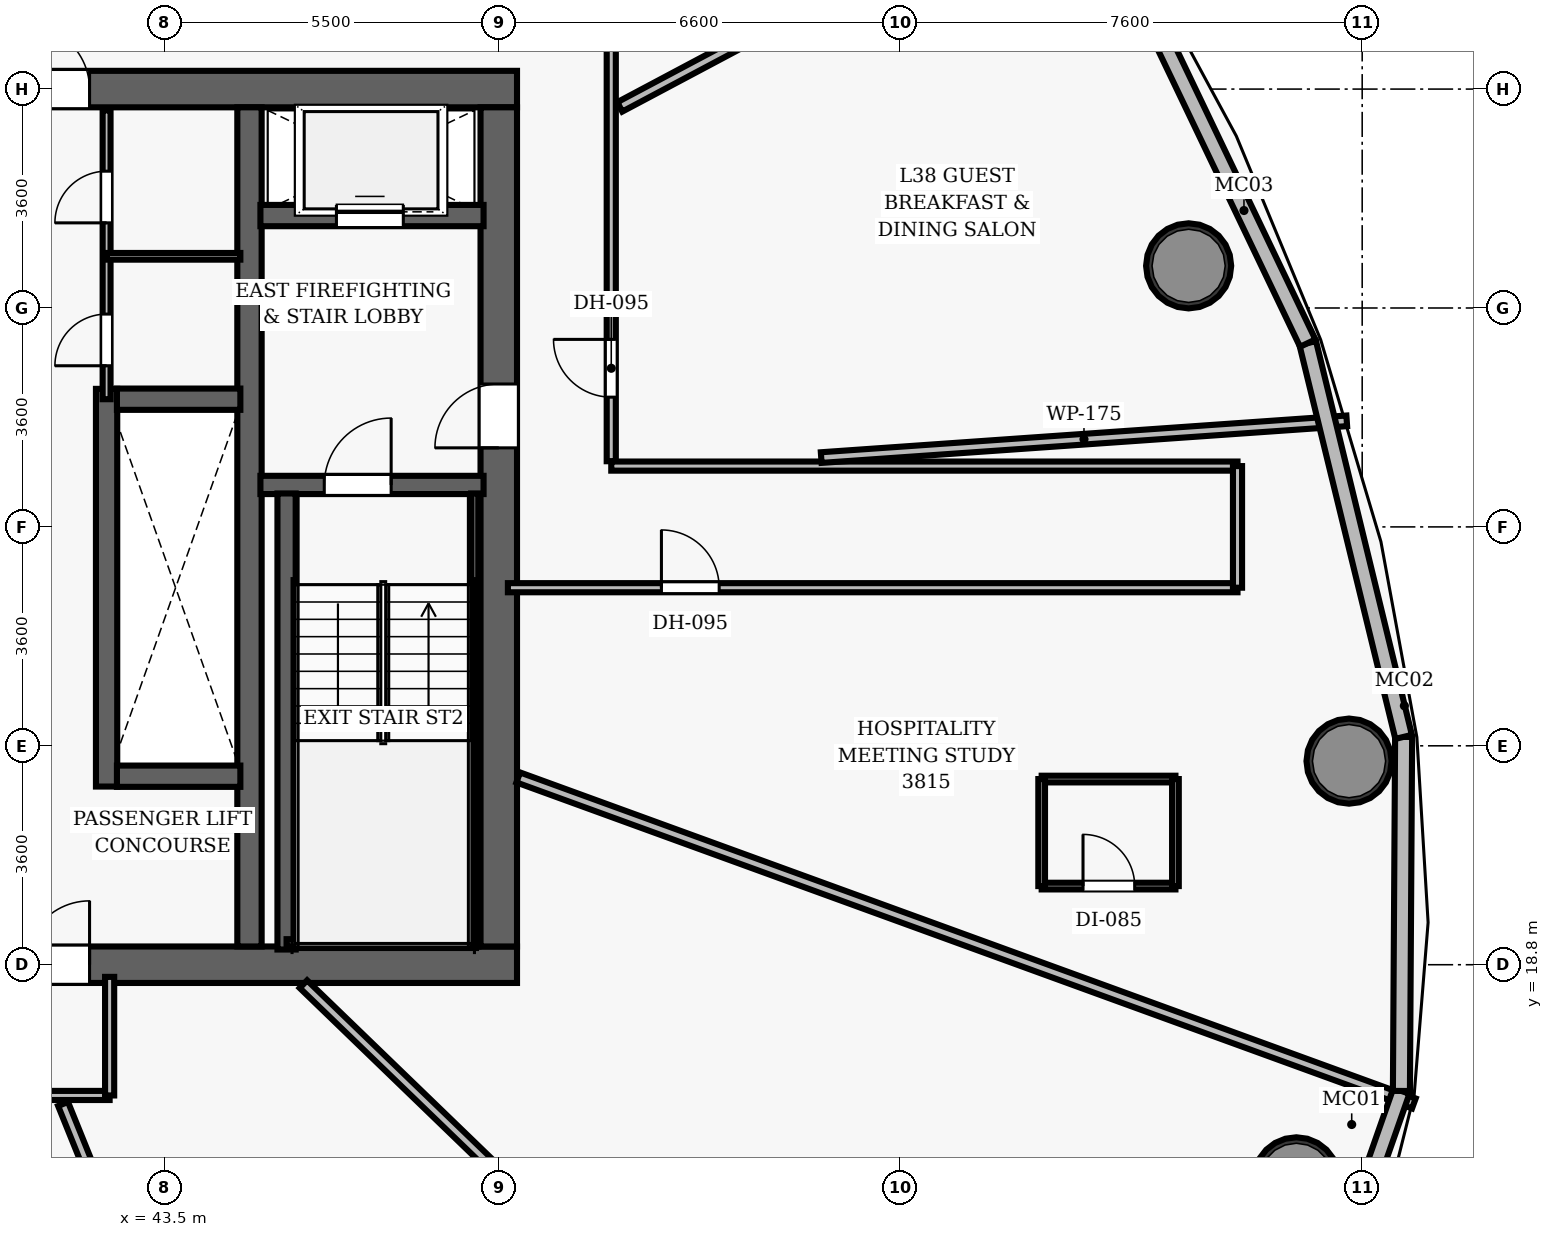
"""IFC4 building model, lengths in metres.
Left out: names, types, materials, properties, quantities, classifications, styles, units other than length and angle.
Written with IfcOpenShell. Run it as: python <this file> out.ifc"""

import sys

from ifc_helpers import new_model, si_unit, direction, frame, frame_2d, origin, origin_2d, place, context, subcontext, project, spatial, rectangle, hollow_circle, extrude, element, fill, save


model = new_model("IFC4")
c1 = context("Model", 3, precision=1e-05, world=origin(), true_north=direction((0.0, 1.0)))
c2 = subcontext(c1, "Body", "Model", "MODEL_VIEW")
j1 = project(units=[si_unit("LENGTHUNIT", "METRE"), si_unit("PLANEANGLEUNIT", "RADIAN")], contexts=[c1])
p1 = place(None, origin())
s1 = spatial("IfcSite", under=j1, at=p1, CompositionType="ELEMENT")
p2 = place(p1, origin())
s2 = spatial("IfcBuilding", under=s1, at=p2, CompositionType="ELEMENT")
p3 = place(p2, frame((0.0, 0.0, 151.8)))
s3 = spatial("IfcBuildingStorey", under=s2, at=p3, CompositionType="ELEMENT", Elevation=151.8)
p4 = place(p3, frame((26.7, 18.8, 0.0), z_axis=(0.0, 0.0, 1.0), x_axis=(1.0, 0.0, 0.0)))
e1 = element("IfcWall", 1, at=p4, inside=s3, PredefinedType="SHEAR", context=c2, shape_type="SweptSolid", body=[
    extrude(rectangle(XDim=22.6, YDim=0.6, at=frame_2d((11.3, 0.0))), origin(), (0.0, 0.0, 1.0), 3.5),
])
p5 = place(p4, frame((14.52, 0.0, 0.0)))
e2 = element("IfcOpeningElement", 2, at=p5, cuts=e1, PredefinedType="OPENING", context=c2, shape_type="SweptSolid", body=[
    extrude(rectangle(XDim=1.05, YDim=2.15, at=frame_2d((0.525, 1.075))), frame((0.0, 0.31, 0.0), z_axis=(0.0, -1.0, 0.0), x_axis=(1.0, 0.0, 0.0)), (0.0, 0.0, 1.0), 0.62),
])
p6 = place(p3, frame((26.7, 33.2, 0.0), z_axis=(0.0, 0.0, 1.0), x_axis=(1.0, 0.0, 0.0)))
e3 = element("IfcWall", 3, at=p6, inside=s3, PredefinedType="SHEAR", context=c2, shape_type="SweptSolid", body=[
    extrude(rectangle(XDim=22.6, YDim=0.6, at=frame_2d((11.3, 0.0))), origin(), (0.0, 0.0, 1.0), 3.5),
])
p7 = place(p6, frame((4.62, 0.0, 0.0)))
e4 = element("IfcOpeningElement", 4, at=p7, cuts=e3, PredefinedType="OPENING", context=c2, shape_type="SweptSolid", body=[
    extrude(rectangle(XDim=1.05, YDim=2.15, at=frame_2d((0.525, 1.075))), frame((0.0, 0.31, 0.0), z_axis=(0.0, -1.0, 0.0), x_axis=(1.0, 0.0, 0.0)), (0.0, 0.0, 1.0), 0.62),
])
p8 = place(p6, frame((14.52, 0.0, 0.0)))
e5 = element("IfcOpeningElement", 5, at=p8, cuts=e3, PredefinedType="OPENING", context=c2, shape_type="SweptSolid", body=[
    extrude(rectangle(XDim=1.05, YDim=2.15, at=frame_2d((0.525, 1.075))), frame((0.0, 0.31, 0.0), z_axis=(0.0, -1.0, 0.0), x_axis=(1.0, 0.0, 0.0)), (0.0, 0.0, 1.0), 0.62),
])
p9 = place(p3, frame((49.0, 19.1, 0.0), z_axis=(0.0, 0.0, 1.0), x_axis=(0.0, 1.0, 0.0)))
e6 = element("IfcWall", 6, at=p9, inside=s3, PredefinedType="SHEAR", context=c2, shape_type="SweptSolid", body=[
    extrude(rectangle(XDim=13.8, YDim=0.6, at=frame_2d((6.9, 0.0))), origin(), (0.0, 0.0, 1.0), 3.5),
])
p10 = place(p9, frame((8.2, 0.0, 0.0)))
e7 = element("IfcOpeningElement", 7, at=p10, cuts=e6, PredefinedType="OPENING", context=c2, shape_type="SweptSolid", body=[
    extrude(rectangle(XDim=1.05, YDim=2.15, at=frame_2d((0.525, 1.075))), frame((0.0, 0.31, 0.0), z_axis=(0.0, -1.0, 0.0), x_axis=(1.0, 0.0, 0.0)), (0.0, 0.0, 1.0), 0.62),
])
p11 = place(p3, frame((44.9, 19.1, 0.0), z_axis=(0.0, 0.0, 1.0), x_axis=(0.0, 1.0, 0.0)))
e8 = element("IfcWall", 8, at=p11, inside=s3, PredefinedType="SHEAR", context=c2, shape_type="SweptSolid", body=[
    extrude(rectangle(XDim=13.8, YDim=0.4, at=frame_2d((6.9, 0.0))), origin(), (0.0, 0.0, 1.0), 3.5),
])
for number, where, z_axis, x_axis in (
    (9, (62.118, 15.262, 0.0), (0.0, 0.0, 1.0), (1.0, 0.0, 0.0)),
    (10, (62.984, 22.148, 0.0), (0.0, 0.0, 1.0), (1.0, 0.0, 0.0)),
    (11, (60.346, 30.293, 0.0), (0.0, 0.0, 1.0), (1.0, 0.0, 0.0)),
):
    element("IfcColumn", number, at=place(p3, frame(where, z_axis=z_axis, x_axis=x_axis)), inside=s3, PredefinedType="COLUMN", context=c2, shape_type="SweptSolid", body=[
        extrude(hollow_circle(Radius=0.7, WallThickness=0.055, at=origin_2d()), origin(), (0.0, 0.0, 1.0), 3.5),
    ])
p12 = place(p3, frame((45.08, 26.69, 0.0), z_axis=(0.0, 0.0, 1.0), x_axis=(1.0, 0.0, 0.0)))
e12 = element("IfcWall", 12, at=p12, inside=s3, PredefinedType="SHEAR", context=c2, shape_type="SweptSolid", body=[
    extrude(rectangle(XDim=3.67, YDim=0.3, at=frame_2d((1.835, 0.0))), origin(), (0.0, 0.0, 1.0), 3.5),
])
p13 = place(p12, frame((1.05, 0.0, 0.0)))
e13 = element("IfcOpeningElement", 13, at=p13, cuts=e12, PredefinedType="OPENING", context=c2, shape_type="SweptSolid", body=[
    extrude(rectangle(XDim=1.1, YDim=2.15, at=frame_2d((0.55, 1.075))), frame((0.0, 0.16, 0.0), z_axis=(0.0, -1.0, 0.0), x_axis=(1.0, 0.0, 0.0)), (0.0, 0.0, 1.0), 0.32),
])
p14 = place(p3, frame((45.51, 19.05, 0.0), z_axis=(0.0, 0.0, 1.0), x_axis=(0.0, 1.0, 0.0)))
e14 = element("IfcWall", 14, at=p14, inside=s3, PredefinedType="SHEAR", context=c2, shape_type="SweptSolid", body=[
    extrude(rectangle(XDim=7.5, YDim=0.3, at=frame_2d((3.75, 0.0))), origin(), (0.0, 0.0, 1.0), 3.5),
])
p15 = place(p3, frame((48.605, 19.1, 0.0), z_axis=(0.0, 0.0, 1.0), x_axis=(0.0, 1.0, 0.0)))
e15 = element("IfcWall", 15, at=p15, inside=s3, PredefinedType="SHEAR", context=c2, shape_type="SweptSolid", body=[
    extrude(rectangle(XDim=7.45, YDim=0.12, at=frame_2d((3.725, 0.0))), origin(), (0.0, 0.0, 1.0), 3.5),
])
p16 = place(p3, frame((45.51, 19.16, 0.0), z_axis=(0.0, 0.0, 1.0), x_axis=(1.0, 0.0, 0.0)))
e16 = element("IfcWall", 16, at=p16, inside=s3, PredefinedType="SHEAR", context=c2, shape_type="SweptSolid", body=[
    extrude(rectangle(XDim=3.095, YDim=0.12, at=frame_2d((1.547, 0.0))), origin(), (0.0, 0.0, 1.0), 3.5),
])
p17 = place(p3, frame((45.08, 31.12, 0.0), z_axis=(0.0, 0.0, 1.0), x_axis=(1.0, 0.0, 0.0)))
e17 = element("IfcWall", 17, at=p17, inside=s3, PredefinedType="SHEAR", context=c2, shape_type="SweptSolid", body=[
    extrude(rectangle(XDim=3.67, YDim=0.35, at=frame_2d((1.835, 0.0))), origin(), (0.0, 0.0, 1.0), 2.675),
])
p18 = place(p17, frame((1.25, 0.0, 0.0)))
e18 = element("IfcOpeningElement", 18, at=p18, cuts=e17, PredefinedType="OPENING", context=c2, shape_type="SweptSolid", body=[
    extrude(rectangle(XDim=1.1, YDim=2.15, at=frame_2d((0.55, 1.075))), frame((0.0, 0.185, 0.0), z_axis=(0.0, -1.0, 0.0), x_axis=(1.0, 0.0, 0.0)), (0.0, 0.0, 1.0), 0.37),
])
p19 = place(p3, frame((42.55, 21.73, 0.0), z_axis=(0.0, 0.0, 1.0), x_axis=(0.0, 1.0, 0.0)))
e19 = element("IfcWall", 19, at=p19, inside=s3, PredefinedType="SHEAR", context=c2, shape_type="SweptSolid", body=[
    extrude(rectangle(XDim=6.54, YDim=0.35, at=frame_2d((3.27, 0.0))), origin(), (0.0, 0.0, 1.0), 2.675),
])
for number, where, z_axis, x_axis in (
    (20, (42.72, 21.9, 0.0), (0.0, 0.0, 1.0), (1.0, 0.0, 0.0)),
    (21, (42.72, 28.1, 0.0), (0.0, 0.0, 1.0), (1.0, 0.0, 0.0)),
):
    element("IfcWall", number, at=place(p3, frame(where, z_axis=z_axis, x_axis=x_axis)), inside=s3, PredefinedType="SHEAR", context=c2, shape_type="SweptSolid", body=[
        extrude(rectangle(XDim=2.03, YDim=0.35, at=frame_2d((1.015, 0.0))), origin(), (0.0, 0.0, 1.0), 2.675),
    ])
p20 = place(p3, frame((42.55, 28.1, 0.0), z_axis=(0.0, 0.0, 1.0), x_axis=(0.0, 1.0, 0.0)))
e22 = element("IfcWall", 22, at=p20, inside=s3, PredefinedType="PARTITIONING", context=c2, shape_type="SweptSolid", body=[
    extrude(rectangle(XDim=4.75, YDim=0.13, at=frame_2d((2.375, 0.0))), origin(), (0.0, 0.0, 1.0), 2.675),
])
p21 = place(p20, frame((0.55, 0.0, 0.0)))
e23 = element("IfcOpeningElement", 23, at=p21, cuts=e22, PredefinedType="OPENING", context=c2, shape_type="SweptSolid", body=[
    extrude(rectangle(XDim=0.85, YDim=2.1, at=frame_2d((0.425, 1.05))), frame((0.0, 0.075, 0.0), z_axis=(0.0, -1.0, 0.0), x_axis=(1.0, 0.0, 0.0)), (0.0, 0.0, 1.0), 0.15),
])
p22 = place(p20, frame((2.9, 0.0, 0.0)))
e24 = element("IfcOpeningElement", 24, at=p22, cuts=e22, PredefinedType="OPENING", context=c2, shape_type="SweptSolid", body=[
    extrude(rectangle(XDim=0.85, YDim=2.1, at=frame_2d((0.425, 1.05))), frame((0.0, 0.075, 0.0), z_axis=(0.0, -1.0, 0.0), x_axis=(1.0, 0.0, 0.0)), (0.0, 0.0, 1.0), 0.15),
])
p23 = place(p3, frame((42.55, 30.45, 0.0), z_axis=(0.0, 0.0, 1.0), x_axis=(1.0, 0.0, 0.0)))
e25 = element("IfcWall", 25, at=p23, inside=s3, PredefinedType="PARTITIONING", context=c2, shape_type="SweptSolid", body=[
    extrude(rectangle(XDim=2.2, YDim=0.11, at=frame_2d((1.1, 0.0))), origin(), (0.0, 0.0, 1.0), 2.675),
])
p24 = place(p3, frame((50.85, 27.08, 0.0), z_axis=(0.0, 0.0, 1.0), x_axis=(0.0, 1.0, 0.0)))
e26 = element("IfcWall", 26, at=p24, inside=s3, PredefinedType="PARTITIONING", context=c2, shape_type="SweptSolid", body=[
    extrude(rectangle(XDim=8.12, YDim=0.15, at=frame_2d((4.06, 0.0))), origin(), (0.0, 0.0, 1.0), 2.675),
])
p25 = place(p24, frame((1.054, 0.0, 0.0)))
e27 = element("IfcOpeningElement", 27, at=p25, cuts=e26, PredefinedType="OPENING", context=c2, shape_type="SweptSolid", body=[
    extrude(rectangle(XDim=0.95, YDim=2.15, at=frame_2d((0.475, 1.075))), frame((0.0, 0.085, 0.0), z_axis=(0.0, -1.0, 0.0), x_axis=(1.0, 0.0, 0.0)), (0.0, 0.0, 1.0), 0.17),
])
p26 = place(p3, frame((50.85, 27.0, 0.0), z_axis=(0.0, 0.0, 1.0), x_axis=(1.0, 0.0, 0.0)))
e28 = element("IfcWall", 28, at=p26, inside=s3, PredefinedType="PARTITIONING", context=c2, shape_type="SweptSolid", body=[
    extrude(rectangle(XDim=10.299, YDim=0.15, at=frame_2d((5.15, 0.0))), origin(), (0.0, 0.0, 1.0), 2.675),
])
p27 = place(p3, frame((49.15, 25.0, 0.0), z_axis=(0.0, 0.0, 1.0), x_axis=(1.0, 0.0, 0.0)))
e29 = element("IfcWall", 29, at=p27, inside=s3, PredefinedType="PARTITIONING", context=c2, shape_type="SweptSolid", body=[
    extrude(rectangle(XDim=12.0, YDim=0.15, at=frame_2d((6.0, 0.0))), origin(), (0.0, 0.0, 1.0), 2.675),
])
p28 = place(p27, frame((2.525, 0.0, 0.0)))
e30 = element("IfcOpeningElement", 30, at=p28, cuts=e29, PredefinedType="OPENING", context=c2, shape_type="SweptSolid", body=[
    extrude(rectangle(XDim=0.95, YDim=2.15, at=frame_2d((0.475, 1.075))), frame((0.0, 0.085, 0.0), z_axis=(0.0, -1.0, 0.0), x_axis=(1.0, 0.0, 0.0)), (0.0, 0.0, 1.0), 0.17),
])
p29 = place(p3, frame((61.149, 25.0, 0.0), z_axis=(0.0, 0.0, 1.0), x_axis=(0.0, 1.0, 0.0)))
e31 = element("IfcWall", 31, at=p29, inside=s3, PredefinedType="PARTITIONING", context=c2, shape_type="SweptSolid", body=[
    extrude(rectangle(XDim=2.0, YDim=0.15, at=frame_2d((1.0, 0.0))), origin(), (0.0, 0.0, 1.0), 2.675),
])
p30 = place(p3, frame((39.05, 16.65, 0.0), z_axis=(0.0, 0.0, 1.0), x_axis=(1.0, 0.0, 0.0)))
e32 = element("IfcWall", 32, at=p30, inside=s3, PredefinedType="PARTITIONING", context=c2, shape_type="SweptSolid", body=[
    extrude(rectangle(XDim=3.55, YDim=0.15, at=frame_2d((1.775, 0.0))), origin(), (0.0, 0.0, 1.0), 2.675),
])
p31 = place(p30, frame((0.293, 0.0, 0.0)))
e33 = element("IfcOpeningElement", 33, at=p31, cuts=e32, PredefinedType="OPENING", context=c2, shape_type="SweptSolid", body=[
    extrude(rectangle(XDim=0.95, YDim=2.15, at=frame_2d((0.475, 1.075))), frame((0.0, 0.085, 0.0), z_axis=(0.0, -1.0, 0.0), x_axis=(1.0, 0.0, 0.0)), (0.0, 0.0, 1.0), 0.17),
])
p32 = place(p3, frame((42.6, 16.65, 0.0), z_axis=(0.0, 0.0, 1.0), x_axis=(0.0, 1.0, 0.0)))
e34 = element("IfcWall", 34, at=p32, inside=s3, PredefinedType="PARTITIONING", context=c2, shape_type="SweptSolid", body=[
    extrude(rectangle(XDim=1.95, YDim=0.15, at=frame_2d((0.975, 0.0))), origin(), (0.0, 0.0, 1.0), 2.675),
])
p33 = place(p3, frame((54.303, 27.14, 0.0), z_axis=(0.0, 0.0, 1.0), x_axis=(0.997563440147, 0.069765198221, 0.0)))
e35 = element("IfcWall", 35, at=p33, inside=s3, PredefinedType="PARTITIONING", context=c2, shape_type="SweptSolid", body=[
    extrude(rectangle(XDim=8.665, YDim=0.175, at=frame_2d((4.332, 0.0))), origin(), (0.0, 0.0, 1.0), 2.675),
])
p34 = place(p3, frame((50.99, 32.907, 0.0), z_axis=(0.0, 0.0, 1.0), x_axis=(0.88295032644, 0.469466421632, 0.0)))
e36 = element("IfcWall", 36, at=p34, inside=s3, PredefinedType="PARTITIONING", context=c2, shape_type="SweptSolid", body=[
    extrude(rectangle(XDim=8.565, YDim=0.175, at=frame_2d((4.282, 0.0))), origin(), (0.0, 0.0, 1.0), 2.675),
])
p35 = place(p3, frame((41.834, 16.51, 0.0), z_axis=(0.0, 0.0, 1.0), x_axis=(0.374613654404, -0.927181001711, 0.0)))
e37 = element("IfcWall", 37, at=p35, inside=s3, PredefinedType="PARTITIONING", context=c2, shape_type="SweptSolid", body=[
    extrude(rectangle(XDim=14.5, YDim=0.175, at=frame_2d((7.25, 0.0))), origin(), (0.0, 0.0, 1.0), 2.675),
])
p36 = place(p3, frame((45.787, 18.48, 0.0), z_axis=(0.0, 0.0, 1.0), x_axis=(0.719344241766, -0.694653771197, 0.0)))
e38 = element("IfcWall", 38, at=p36, inside=s3, PredefinedType="PARTITIONING", context=c2, shape_type="SweptSolid", body=[
    extrude(rectangle(XDim=16.543, YDim=0.175, at=frame_2d((8.271, 0.0))), origin(), (0.0, 0.0, 1.0), 2.675),
])
p37 = place(p3, frame((49.32, 21.88, 0.0), z_axis=(0.0, 0.0, 1.0), x_axis=(0.939689698129, -0.342028173154, 0.0)))
e39 = element("IfcWall", 39, at=p37, inside=s3, PredefinedType="PARTITIONING", context=c2, shape_type="SweptSolid", body=[
    extrude(rectangle(XDim=15.675, YDim=0.175, at=frame_2d((7.837, 0.0))), origin(), (0.0, 0.0, 1.0), 2.675),
])
p38 = place(p3, frame((57.929, 20.093, 0.0), z_axis=(0.0, 0.0, 1.0), x_axis=(1.0, 0.0, 0.0)))
e40 = element("IfcWall", 40, at=p38, inside=s3, PredefinedType="PARTITIONING", context=c2, shape_type="SweptSolid", body=[
    extrude(rectangle(XDim=2.2, YDim=0.11, at=frame_2d((1.1, 0.0))), origin(), (0.0, 0.0, 1.0), 2.675),
])
p39 = place(p38, frame((0.68, 0.0, 0.0)))
e41 = element("IfcOpeningElement", 41, at=p39, cuts=e40, PredefinedType="OPENING", context=c2, shape_type="SweptSolid", body=[
    extrude(rectangle(XDim=0.85, YDim=2.1, at=frame_2d((0.425, 1.05))), frame((0.0, 0.065, 0.0), z_axis=(0.0, -1.0, 0.0), x_axis=(1.0, 0.0, 0.0)), (0.0, 0.0, 1.0), 0.13),
])
p40 = place(p3, frame((57.929, 21.853, 0.0), z_axis=(0.0, 0.0, 1.0), x_axis=(1.0, 0.0, 0.0)))
e42 = element("IfcWall", 42, at=p40, inside=s3, PredefinedType="PARTITIONING", context=c2, shape_type="SweptSolid", body=[
    extrude(rectangle(XDim=2.2, YDim=0.11, at=frame_2d((1.1, 0.0))), origin(), (0.0, 0.0, 1.0), 2.675),
])
for number, where, z_axis, x_axis in (
    (43, (57.929, 20.093, 0.0), (0.0, 0.0, 1.0), (0.0, 1.0, 0.0)),
    (44, (60.129, 20.093, 0.0), (0.0, 0.0, 1.0), (0.0, 1.0, 0.0)),
):
    element("IfcWall", number, at=place(p3, frame(where, z_axis=z_axis, x_axis=x_axis)), inside=s3, PredefinedType="PARTITIONING", context=c2, shape_type="SweptSolid", body=[
        extrude(rectangle(XDim=1.76, YDim=0.11, at=frame_2d((0.88, 0.0))), origin(), (0.0, 0.0, 1.0), 2.675),
    ])
p41 = place(p3, frame((63.845, 16.724, 0.0), z_axis=(0.0, 0.0, 1.0), x_axis=(-0.330896813474, -0.943666942747, 0.0)))
e45 = element("IfcWall", 45, at=p41, inside=s3, PredefinedType="SOLIDWALL", context=c2, shape_type="SweptSolid", body=[
    extrude(rectangle(XDim=5.174, YDim=0.28, at=frame_2d((2.587, 0.0))), origin(), (0.0, 0.0, 1.0), 3.26),
])
p42 = place(p3, frame((63.882, 22.547, 0.0), z_axis=(0.0, 0.0, 1.0), x_axis=(-0.006247519482, -0.99998048406, 0.0)))
e46 = element("IfcWall", 46, at=p42, inside=s3, PredefinedType="SOLIDWALL", context=c2, shape_type="SweptSolid", body=[
    extrude(rectangle(XDim=5.823, YDim=0.28, at=frame_2d((2.911, 0.0))), origin(), (0.0, 0.0, 1.0), 3.26),
])
p43 = place(p3, frame((62.304, 29.022, 0.0), z_axis=(0.0, 0.0, 1.0), x_axis=(0.236627302203, -0.971600493954, 0.0)))
e47 = element("IfcWall", 47, at=p43, inside=s3, PredefinedType="SOLIDWALL", context=c2, shape_type="SweptSolid", body=[
    extrude(rectangle(XDim=6.665, YDim=0.28, at=frame_2d((3.333, 0.0))), origin(), (0.0, 0.0, 1.0), 3.26),
])
p44 = place(p3, frame((59.156, 35.6, 0.0), z_axis=(0.0, 0.0, 1.0), x_axis=(0.431705455872, -0.902014633679, 0.0)))
e48 = element("IfcWall", 48, at=p44, inside=s3, PredefinedType="SOLIDWALL", context=c2, shape_type="SweptSolid", body=[
    extrude(rectangle(XDim=7.292, YDim=0.28, at=frame_2d((3.646, 0.0))), origin(), (0.0, 0.0, 1.0), 3.26),
])
p45 = place(p13, origin())
e49 = element("IfcDoor", 49, at=p45, inside=s3, OperationType="SINGLE_SWING_RIGHT", PredefinedType="DOOR", context=c2, shape_type="SweptSolid", body=[
    extrude(rectangle(XDim=1.1, YDim=2.15, at=frame_2d((0.55, 1.075))), frame((0.0, 0.025, 0.0), z_axis=(0.0, -1.0, 0.0), x_axis=(1.0, 0.0, 0.0)), (0.0, 0.0, 1.0), 0.05),
])
fill(e13, e49)
p46 = place(p10, origin())
e50 = element("IfcDoor", 50, at=p46, inside=s3, OperationType="SINGLE_SWING_LEFT", PredefinedType="DOOR", context=c2, shape_type="SweptSolid", body=[
    extrude(rectangle(XDim=1.05, YDim=2.15, at=frame_2d((0.525, 1.075))), frame((0.0, 0.025, 0.0), z_axis=(0.0, -1.0, 0.0), x_axis=(1.0, 0.0, 0.0)), (0.0, 0.0, 1.0), 0.05),
])
fill(e7, e50)
p47 = place(p8, origin())
e51 = element("IfcDoor", 51, at=p47, inside=s3, OperationType="SINGLE_SWING_LEFT", PredefinedType="DOOR", context=c2, shape_type="SweptSolid", body=[
    extrude(rectangle(XDim=1.05, YDim=2.15, at=frame_2d((0.525, 1.075))), frame((0.0, 0.025, 0.0), z_axis=(0.0, -1.0, 0.0), x_axis=(1.0, 0.0, 0.0)), (0.0, 0.0, 1.0), 0.05),
])
fill(e5, e51)
p48 = place(p5, origin())
e52 = element("IfcDoor", 52, at=p48, inside=s3, OperationType="SINGLE_SWING_RIGHT", PredefinedType="DOOR", context=c2, shape_type="SweptSolid", body=[
    extrude(rectangle(XDim=1.05, YDim=2.15, at=frame_2d((0.525, 1.075))), frame((0.0, 0.025, 0.0), z_axis=(0.0, -1.0, 0.0), x_axis=(1.0, 0.0, 0.0)), (0.0, 0.0, 1.0), 0.05),
])
fill(e2, e52)
p49 = place(p21, origin())
e53 = element("IfcDoor", 53, at=p49, inside=s3, OperationType="SINGLE_SWING_LEFT", PredefinedType="DOOR", context=c2, shape_type="SweptSolid", body=[
    extrude(rectangle(XDim=0.85, YDim=2.1, at=frame_2d((0.425, 1.05))), frame((0.0, 0.025, 0.0), z_axis=(0.0, -1.0, 0.0), x_axis=(1.0, 0.0, 0.0)), (0.0, 0.0, 1.0), 0.05),
])
fill(e23, e53)
p50 = place(p22, origin())
e54 = element("IfcDoor", 54, at=p50, inside=s3, OperationType="SINGLE_SWING_LEFT", PredefinedType="DOOR", context=c2, shape_type="SweptSolid", body=[
    extrude(rectangle(XDim=0.85, YDim=2.1, at=frame_2d((0.425, 1.05))), frame((0.0, 0.025, 0.0), z_axis=(0.0, -1.0, 0.0), x_axis=(1.0, 0.0, 0.0)), (0.0, 0.0, 1.0), 0.05),
])
fill(e24, e54)
p51 = place(p25, origin())
e55 = element("IfcDoor", 55, at=p51, inside=s3, OperationType="SINGLE_SWING_RIGHT", PredefinedType="DOOR", context=c2, shape_type="SweptSolid", body=[
    extrude(rectangle(XDim=0.95, YDim=2.15, at=frame_2d((0.475, 1.075))), frame((0.0, 0.025, 0.0), z_axis=(0.0, -1.0, 0.0), x_axis=(1.0, 0.0, 0.0)), (0.0, 0.0, 1.0), 0.05),
])
fill(e27, e55)
p52 = place(p28, origin())
e56 = element("IfcDoor", 56, at=p52, inside=s3, OperationType="SINGLE_SWING_LEFT", PredefinedType="DOOR", context=c2, shape_type="SweptSolid", body=[
    extrude(rectangle(XDim=0.95, YDim=2.15, at=frame_2d((0.475, 1.075))), frame((0.0, 0.025, 0.0), z_axis=(0.0, -1.0, 0.0), x_axis=(1.0, 0.0, 0.0)), (0.0, 0.0, 1.0), 0.05),
])
fill(e30, e56)
p53 = place(p39, origin())
e57 = element("IfcDoor", 57, at=p53, inside=s3, OperationType="SINGLE_SWING_LEFT", PredefinedType="DOOR", context=c2, shape_type="SweptSolid", body=[
    extrude(rectangle(XDim=0.85, YDim=2.1, at=frame_2d((0.425, 1.05))), frame((0.0, 0.025, 0.0), z_axis=(0.0, -1.0, 0.0), x_axis=(1.0, 0.0, 0.0)), (0.0, 0.0, 1.0), 0.05),
])
fill(e41, e57)
p54 = place(p18, origin())
e58 = element("IfcDoor", 58, at=p54, inside=s3, OperationType="SLIDING_TO_LEFT", PredefinedType="DOOR", context=c2, shape_type="SweptSolid", body=[
    extrude(rectangle(XDim=1.1, YDim=2.15, at=frame_2d((0.55, 1.075))), frame((0.0, 0.025, 0.0), z_axis=(0.0, -1.0, 0.0), x_axis=(1.0, 0.0, 0.0)), (0.0, 0.0, 1.0), 0.05),
])
fill(e18, e58)
save(model, sys.argv[1])
